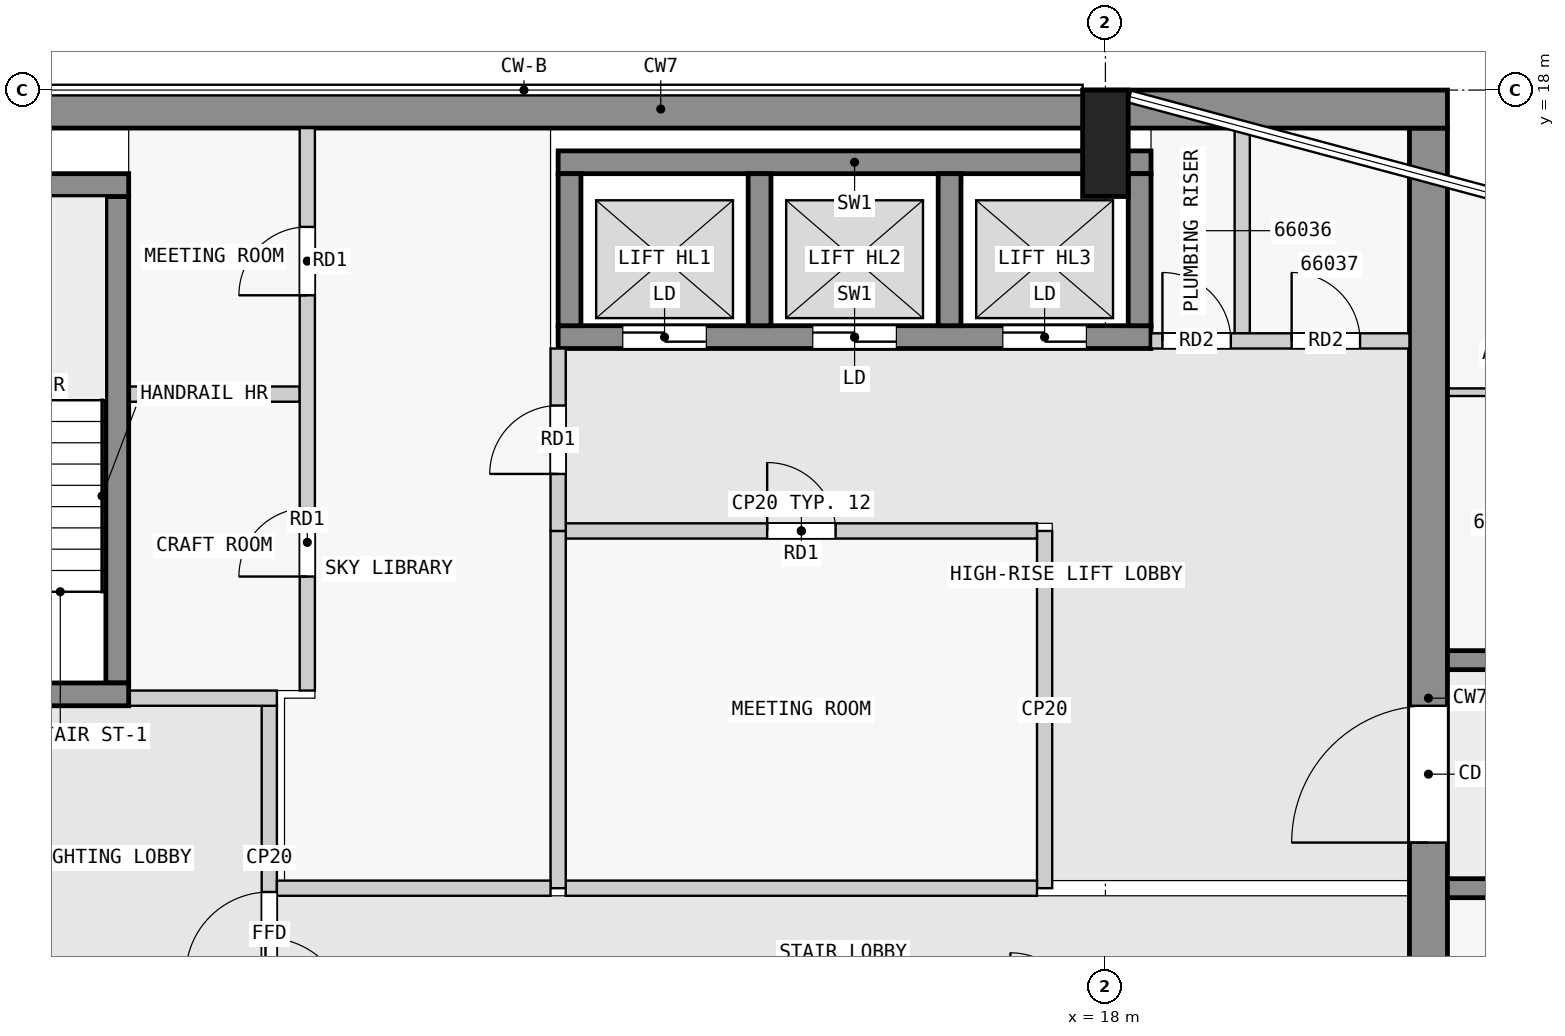
"""IFC4 building model, lengths in metres.
Left out: names, types, materials, properties, quantities, classifications, styles, units other than length and angle.
Written with IfcOpenShell. Run it as: python <this file> out.ifc"""

import sys

from ifc_helpers import new_model, si_unit, direction, frame, frame_2d, origin, origin_2d, place, context, subcontext, project, spatial, rectangle, extrude, element, fill, save


model = new_model("IFC4")
c1 = context("Model", 3, precision=1e-05, world=origin(), true_north=direction((0.0, 1.0)))
c2 = subcontext(c1, "Body", "Model", "MODEL_VIEW")
j1 = project(units=[si_unit("LENGTHUNIT", "METRE"), si_unit("PLANEANGLEUNIT", "RADIAN")], contexts=[c1])
p1 = place(None, origin())
s1 = spatial("IfcSite", under=j1, at=p1, CompositionType="ELEMENT")
p2 = place(p1, origin())
s2 = spatial("IfcBuilding", under=s1, at=p2, CompositionType="ELEMENT")
p3 = place(p2, frame((0.0, 0.0, 252.9)))
s3 = spatial("IfcBuildingStorey", under=s2, at=p3, CompositionType="ELEMENT", Elevation=252.9)
p4 = place(p3, frame((18.0, 17.3, 0.0), z_axis=(0.0, 0.0, 1.0), x_axis=(1.0, 0.0, 0.0)))
e1 = element("IfcColumn", 1, at=p4, inside=s3, PredefinedType="COLUMN", context=c2, shape_type="SweptSolid", body=[
    extrude(rectangle(XDim=0.6, YDim=1.4, at=origin_2d()), origin(), (0.0, 0.0, 1.0), 3.5),
])
p5 = place(p3, frame((1.8, 17.75, 0.0), z_axis=(0.0, 0.0, 1.0), x_axis=(1.0, 0.0, 0.0)))
e2 = element("IfcWall", 2, at=p5, inside=s3, PredefinedType="SHEAR", context=c2, shape_type="SweptSolid", body=[
    extrude(rectangle(XDim=20.7, YDim=0.5, at=frame_2d((10.35, 0.0))), origin(), (0.0, 0.0, 1.0), 3.25),
])
p6 = place(p3, frame((22.25, 2.5, 0.0), z_axis=(0.0, 0.0, 1.0), x_axis=(0.0, 1.0, 0.0)))
e3 = element("IfcWall", 3, at=p6, inside=s3, PredefinedType="SHEAR", context=c2, shape_type="SweptSolid", body=[
    extrude(rectangle(XDim=15.0, YDim=0.5, at=frame_2d((7.5, 0.0))), origin(), (0.0, 0.0, 1.0), 3.25),
])
p7 = place(p6, frame((5.6, 0.0, 0.0)))
e4 = element("IfcOpeningElement", 4, at=p7, cuts=e3, PredefinedType="OPENING", context=c2, shape_type="SweptSolid", body=[
    extrude(rectangle(XDim=1.8, YDim=2.1, at=frame_2d((0.9, 1.05))), frame((0.0, 0.26, 0.0), z_axis=(0.0, -1.0, 0.0), x_axis=(1.0, 0.0, 0.0)), (0.0, 0.0, 1.0), 0.52),
])
p8 = place(p3, frame((2.3, 10.05, 0.0), z_axis=(0.0, 0.0, 1.0), x_axis=(1.0, 0.0, 0.0)))
e5 = element("IfcWall", 5, at=p8, inside=s3, PredefinedType="SHEAR", context=c2, shape_type="SweptSolid", body=[
    extrude(rectangle(XDim=2.85, YDim=0.3, at=frame_2d((1.425, 0.0))), origin(), (0.0, 0.0, 1.0), 3.25),
])
p9 = place(p8, frame((0.25, 0.0, 0.0)))
e6 = element("IfcOpeningElement", 6, at=p9, cuts=e5, PredefinedType="OPENING", context=c2, shape_type="SweptSolid", body=[
    extrude(rectangle(XDim=1.1, YDim=2.1, at=frame_2d((0.55, 1.05))), frame((0.0, 0.16, 0.0), z_axis=(0.0, -1.0, 0.0), x_axis=(1.0, 0.0, 0.0)), (0.0, 0.0, 1.0), 0.32),
])
p10 = place(p3, frame((5.0, 10.2, 0.0), z_axis=(0.0, 0.0, 1.0), x_axis=(0.0, 1.0, 0.0)))
e7 = element("IfcWall", 7, at=p10, inside=s3, PredefinedType="SHEAR", context=c2, shape_type="SweptSolid", body=[
    extrude(rectangle(XDim=6.4, YDim=0.3, at=frame_2d((3.2, 0.0))), origin(), (0.0, 0.0, 1.0), 3.25),
])
p11 = place(p3, frame((2.3, 16.75, 0.0), z_axis=(0.0, 0.0, 1.0), x_axis=(1.0, 0.0, 0.0)))
e8 = element("IfcWall", 8, at=p11, inside=s3, PredefinedType="SHEAR", context=c2, shape_type="SweptSolid", body=[
    extrude(rectangle(XDim=2.85, YDim=0.3, at=frame_2d((1.425, 0.0))), origin(), (0.0, 0.0, 1.0), 3.25),
])
p12 = place(p3, frame((10.8, 17.05, 0.0), z_axis=(0.0, 0.0, 1.0), x_axis=(1.0, 0.0, 0.0)))
e9 = element("IfcWall", 9, at=p12, inside=s3, PredefinedType="SHEAR", context=c2, shape_type="SweptSolid", body=[
    extrude(rectangle(XDim=7.8, YDim=0.3, at=frame_2d((3.9, 0.0))), origin(), (0.0, 0.0, 1.0), 3.25),
])
p13 = place(p3, frame((10.8, 14.75, 0.0), z_axis=(0.0, 0.0, 1.0), x_axis=(1.0, 0.0, 0.0)))
e10 = element("IfcWall", 10, at=p13, inside=s3, PredefinedType="SHEAR", context=c2, shape_type="SweptSolid", body=[
    extrude(rectangle(XDim=7.8, YDim=0.3, at=frame_2d((3.9, 0.0))), origin(), (0.0, 0.0, 1.0), 3.25),
])
p14 = place(p13, frame((0.85, 0.0, 0.0)))
e11 = element("IfcOpeningElement", 11, at=p14, cuts=e10, PredefinedType="OPENING", context=c2, shape_type="SweptSolid", body=[
    extrude(rectangle(XDim=1.1, YDim=2.1, at=frame_2d((0.55, 1.05))), frame((0.0, 0.16, 0.0), z_axis=(0.0, -1.0, 0.0), x_axis=(1.0, 0.0, 0.0)), (0.0, 0.0, 1.0), 0.32),
])
p15 = place(p13, frame((3.35, 0.0, 0.0)))
e12 = element("IfcOpeningElement", 12, at=p15, cuts=e10, PredefinedType="OPENING", context=c2, shape_type="SweptSolid", body=[
    extrude(rectangle(XDim=1.1, YDim=2.1, at=frame_2d((0.55, 1.05))), frame((0.0, 0.16, 0.0), z_axis=(0.0, -1.0, 0.0), x_axis=(1.0, 0.0, 0.0)), (0.0, 0.0, 1.0), 0.32),
])
p16 = place(p13, frame((5.85, 0.0, 0.0)))
e13 = element("IfcOpeningElement", 13, at=p16, cuts=e10, PredefinedType="OPENING", context=c2, shape_type="SweptSolid", body=[
    extrude(rectangle(XDim=1.1, YDim=2.1, at=frame_2d((0.55, 1.05))), frame((0.0, 0.16, 0.0), z_axis=(0.0, -1.0, 0.0), x_axis=(1.0, 0.0, 0.0)), (0.0, 0.0, 1.0), 0.32),
])
for number, where, z_axis, x_axis in (
    (14, (10.95, 14.9, 0.0), (0.0, 0.0, 1.0), (0.0, 1.0, 0.0)),
    (15, (13.45, 14.9, 0.0), (0.0, 0.0, 1.0), (0.0, 1.0, 0.0)),
    (16, (15.95, 14.9, 0.0), (0.0, 0.0, 1.0), (0.0, 1.0, 0.0)),
    (17, (18.45, 14.9, 0.0), (0.0, 0.0, 1.0), (0.0, 1.0, 0.0)),
):
    element("IfcWall", number, at=place(p3, frame(where, z_axis=z_axis, x_axis=x_axis)), inside=s3, PredefinedType="SHEAR", context=c2, shape_type="SweptSolid", body=[
        extrude(rectangle(XDim=2.0, YDim=0.3, at=frame_2d((1.0, 0.0))), origin(), (0.0, 0.0, 1.0), 3.25),
    ])
p17 = place(p3, frame((22.5, 7.5, 0.0), z_axis=(0.0, 0.0, 1.0), x_axis=(1.0, 0.0, 0.0)))
e18 = element("IfcWall", 18, at=p17, inside=s3, PredefinedType="SHEAR", context=c2, shape_type="SweptSolid", body=[
    extrude(rectangle(XDim=22.5, YDim=0.25, at=frame_2d((11.25, 0.0))), origin(), (0.0, 0.0, 1.0), 3.25),
])
p18 = place(p17, frame((1.75, 0.0, 0.0)))
e19 = element("IfcOpeningElement", 19, at=p18, cuts=e18, PredefinedType="OPENING", context=c2, shape_type="SweptSolid", body=[
    extrude(rectangle(XDim=1.0, YDim=2.1, at=frame_2d((0.5, 1.05))), frame((0.0, 0.135, 0.0), z_axis=(0.0, -1.0, 0.0), x_axis=(1.0, 0.0, 0.0)), (0.0, 0.0, 1.0), 0.27),
])
p19 = place(p17, frame((5.85, 0.0, 0.0)))
e20 = element("IfcOpeningElement", 20, at=p19, cuts=e18, PredefinedType="OPENING", context=c2, shape_type="SweptSolid", body=[
    extrude(rectangle(XDim=1.8, YDim=2.1, at=frame_2d((0.9, 1.05))), frame((0.0, 0.135, 0.0), z_axis=(0.0, -1.0, 0.0), x_axis=(1.0, 0.0, 0.0)), (0.0, 0.0, 1.0), 0.27),
])
p20 = place(p17, frame((10.75, 0.0, 0.0)))
e21 = element("IfcOpeningElement", 21, at=p20, cuts=e18, PredefinedType="OPENING", context=c2, shape_type="SweptSolid", body=[
    extrude(rectangle(XDim=1.0, YDim=2.1, at=frame_2d((0.5, 1.05))), frame((0.0, 0.135, 0.0), z_axis=(0.0, -1.0, 0.0), x_axis=(1.0, 0.0, 0.0)), (0.0, 0.0, 1.0), 0.27),
])
p21 = place(p17, frame((15.25, 0.0, 0.0)))
e22 = element("IfcOpeningElement", 22, at=p21, cuts=e18, PredefinedType="OPENING", context=c2, shape_type="SweptSolid", body=[
    extrude(rectangle(XDim=1.0, YDim=2.1, at=frame_2d((0.5, 1.05))), frame((0.0, 0.135, 0.0), z_axis=(0.0, -1.0, 0.0), x_axis=(1.0, 0.0, 0.0)), (0.0, 0.0, 1.0), 0.27),
])
p22 = place(p17, frame((18.75, 0.0, 0.0)))
e23 = element("IfcOpeningElement", 23, at=p22, cuts=e18, PredefinedType="OPENING", context=c2, shape_type="SweptSolid", body=[
    extrude(rectangle(XDim=0.9, YDim=2.1, at=frame_2d((0.45, 1.05))), frame((0.0, 0.135, 0.0), z_axis=(0.0, -1.0, 0.0), x_axis=(1.0, 0.0, 0.0)), (0.0, 0.0, 1.0), 0.27),
])
p23 = place(p17, frame((20.95, 0.0, 0.0)))
e24 = element("IfcOpeningElement", 24, at=p23, cuts=e18, PredefinedType="OPENING", context=c2, shape_type="SweptSolid", body=[
    extrude(rectangle(XDim=1.0, YDim=2.1, at=frame_2d((0.5, 1.05))), frame((0.0, 0.135, 0.0), z_axis=(0.0, -1.0, 0.0), x_axis=(1.0, 0.0, 0.0)), (0.0, 0.0, 1.0), 0.27),
])
p24 = place(p3, frame((22.5, 10.5, 0.0), z_axis=(0.0, 0.0, 1.0), x_axis=(1.0, 0.0, 0.0)))
e25 = element("IfcWall", 25, at=p24, inside=s3, PredefinedType="SHEAR", context=c2, shape_type="SweptSolid", body=[
    extrude(rectangle(XDim=22.5, YDim=0.25, at=frame_2d((11.25, 0.0))), origin(), (0.0, 0.0, 1.0), 3.25),
])
p25 = place(p24, frame((1.75, 0.0, 0.0)))
e26 = element("IfcOpeningElement", 26, at=p25, cuts=e25, PredefinedType="OPENING", context=c2, shape_type="SweptSolid", body=[
    extrude(rectangle(XDim=1.0, YDim=2.1, at=frame_2d((0.5, 1.05))), frame((0.0, 0.135, 0.0), z_axis=(0.0, -1.0, 0.0), x_axis=(1.0, 0.0, 0.0)), (0.0, 0.0, 1.0), 0.27),
])
p26 = place(p24, frame((6.25, 0.0, 0.0)))
e27 = element("IfcOpeningElement", 27, at=p26, cuts=e25, PredefinedType="OPENING", context=c2, shape_type="SweptSolid", body=[
    extrude(rectangle(XDim=1.0, YDim=2.1, at=frame_2d((0.5, 1.05))), frame((0.0, 0.135, 0.0), z_axis=(0.0, -1.0, 0.0), x_axis=(1.0, 0.0, 0.0)), (0.0, 0.0, 1.0), 0.27),
])
p27 = place(p24, frame((10.75, 0.0, 0.0)))
e28 = element("IfcOpeningElement", 28, at=p27, cuts=e25, PredefinedType="OPENING", context=c2, shape_type="SweptSolid", body=[
    extrude(rectangle(XDim=1.0, YDim=2.1, at=frame_2d((0.5, 1.05))), frame((0.0, 0.135, 0.0), z_axis=(0.0, -1.0, 0.0), x_axis=(1.0, 0.0, 0.0)), (0.0, 0.0, 1.0), 0.27),
])
p28 = place(p24, frame((16.85, 0.0, 0.0)))
e29 = element("IfcOpeningElement", 29, at=p28, cuts=e25, PredefinedType="OPENING", context=c2, shape_type="SweptSolid", body=[
    extrude(rectangle(XDim=1.0, YDim=2.1, at=frame_2d((0.5, 1.05))), frame((0.0, 0.135, 0.0), z_axis=(0.0, -1.0, 0.0), x_axis=(1.0, 0.0, 0.0)), (0.0, 0.0, 1.0), 0.27),
])
p29 = place(p3, frame((7.0, 5.9, 0.0), z_axis=(0.0, 0.0, 1.0), x_axis=(0.0, 1.0, 0.0)))
e30 = element("IfcWall", 30, at=p29, inside=s3, PredefinedType="PARTITIONING", context=c2, shape_type="SweptSolid", body=[
    extrude(rectangle(XDim=4.0, YDim=0.2, at=frame_2d((2.0, 0.0))), origin(), (0.0, 0.0, 1.0), 3.25),
])
p30 = place(p29, frame((0.45, 0.0, 0.0)))
e31 = element("IfcOpeningElement", 31, at=p30, cuts=e30, PredefinedType="OPENING", context=c2, shape_type="SweptSolid", body=[
    extrude(rectangle(XDim=1.1, YDim=2.1, at=frame_2d((0.55, 1.05))), frame((0.0, 0.11, 0.0), z_axis=(0.0, -1.0, 0.0), x_axis=(1.0, 0.0, 0.0)), (0.0, 0.0, 1.0), 0.22),
])
p31 = place(p3, frame((5.15, 10.0, 0.0), z_axis=(0.0, 0.0, 1.0), x_axis=(1.0, 0.0, 0.0)))
e32 = element("IfcWall", 32, at=p31, inside=s3, PredefinedType="PARTITIONING", context=c2, shape_type="SweptSolid", body=[
    extrude(rectangle(XDim=1.95, YDim=0.2, at=frame_2d((0.975, 0.0))), origin(), (0.0, 0.0, 1.0), 3.25),
])
p32 = place(p3, frame((7.1, 7.5, 0.0), z_axis=(0.0, 0.0, 1.0), x_axis=(1.0, 0.0, 0.0)))
e33 = element("IfcWall", 33, at=p32, inside=s3, PredefinedType="PARTITIONING", context=c2, shape_type="SweptSolid", body=[
    extrude(rectangle(XDim=3.6, YDim=0.2, at=frame_2d((1.8, 0.0))), origin(), (0.0, 0.0, 1.0), 3.25),
])
p33 = place(p3, frame((10.8, 12.2, 0.0), z_axis=(0.0, 0.0, 1.0), x_axis=(0.0, 1.0, 0.0)))
e34 = element("IfcWall", 34, at=p33, inside=s3, PredefinedType="PARTITIONING", context=c2, shape_type="SweptSolid", body=[
    extrude(rectangle(XDim=2.4, YDim=0.2, at=frame_2d((1.2, 0.0))), origin(), (0.0, 0.0, 1.0), 3.25),
])
p34 = place(p33, frame((0.75, 0.0, 0.0)))
e35 = element("IfcOpeningElement", 35, at=p34, cuts=e34, PredefinedType="OPENING", context=c2, shape_type="SweptSolid", body=[
    extrude(rectangle(XDim=0.9, YDim=2.1, at=frame_2d((0.45, 1.05))), frame((0.0, 0.11, 0.0), z_axis=(0.0, -1.0, 0.0), x_axis=(1.0, 0.0, 0.0)), (0.0, 0.0, 1.0), 0.22),
])
p35 = place(p3, frame((10.8, 7.5, 0.0), z_axis=(0.0, 0.0, 1.0), x_axis=(0.0, 1.0, 0.0)))
e36 = element("IfcWall", 36, at=p35, inside=s3, PredefinedType="PARTITIONING", context=c2, shape_type="SweptSolid", body=[
    extrude(rectangle(XDim=4.7, YDim=0.2, at=frame_2d((2.35, 0.0))), origin(), (0.0, 0.0, 1.0), 3.25),
])
p36 = place(p3, frame((10.9, 7.5, 0.0), z_axis=(0.0, 0.0, 1.0), x_axis=(1.0, 0.0, 0.0)))
e37 = element("IfcWall", 37, at=p36, inside=s3, PredefinedType="PARTITIONING", context=c2, shape_type="SweptSolid", body=[
    extrude(rectangle(XDim=6.2, YDim=0.2, at=frame_2d((3.1, 0.0))), origin(), (0.0, 0.0, 1.0), 3.25),
])
p37 = place(p3, frame((17.2, 7.5, 0.0), z_axis=(0.0, 0.0, 1.0), x_axis=(0.0, 1.0, 0.0)))
e38 = element("IfcWall", 38, at=p37, inside=s3, PredefinedType="PARTITIONING", context=c2, shape_type="SweptSolid", body=[
    extrude(rectangle(XDim=4.7, YDim=0.2, at=frame_2d((2.35, 0.0))), origin(), (0.0, 0.0, 1.0), 3.25),
])
p38 = place(p3, frame((10.9, 12.2, 0.0), z_axis=(0.0, 0.0, 1.0), x_axis=(1.0, 0.0, 0.0)))
e39 = element("IfcWall", 39, at=p38, inside=s3, PredefinedType="PARTITIONING", context=c2, shape_type="SweptSolid", body=[
    extrude(rectangle(XDim=6.2, YDim=0.2, at=frame_2d((3.1, 0.0))), origin(), (0.0, 0.0, 1.0), 3.25),
])
p39 = place(p38, frame((2.65, 0.0, 0.0)))
e40 = element("IfcOpeningElement", 40, at=p39, cuts=e39, PredefinedType="OPENING", context=c2, shape_type="SweptSolid", body=[
    extrude(rectangle(XDim=0.9, YDim=2.1, at=frame_2d((0.45, 1.05))), frame((0.0, 0.11, 0.0), z_axis=(0.0, -1.0, 0.0), x_axis=(1.0, 0.0, 0.0)), (0.0, 0.0, 1.0), 0.22),
])
p40 = place(p3, frame((7.5, 10.1, 0.0), z_axis=(0.0, 0.0, 1.0), x_axis=(0.0, 1.0, 0.0)))
e41 = element("IfcWall", 41, at=p40, inside=s3, PredefinedType="PARTITIONING", context=c2, shape_type="SweptSolid", body=[
    extrude(rectangle(XDim=7.4, YDim=0.2, at=frame_2d((3.7, 0.0))), origin(), (0.0, 0.0, 1.0), 3.25),
])
p41 = place(p40, frame((1.5, 0.0, 0.0)))
e42 = element("IfcOpeningElement", 42, at=p41, cuts=e41, PredefinedType="OPENING", context=c2, shape_type="SweptSolid", body=[
    extrude(rectangle(XDim=0.9, YDim=2.1, at=frame_2d((0.45, 1.05))), frame((0.0, 0.11, 0.0), z_axis=(0.0, -1.0, 0.0), x_axis=(1.0, 0.0, 0.0)), (0.0, 0.0, 1.0), 0.22),
])
p42 = place(p40, frame((5.2, 0.0, 0.0)))
e43 = element("IfcOpeningElement", 43, at=p42, cuts=e41, PredefinedType="OPENING", context=c2, shape_type="SweptSolid", body=[
    extrude(rectangle(XDim=0.9, YDim=2.1, at=frame_2d((0.45, 1.05))), frame((0.0, 0.11, 0.0), z_axis=(0.0, -1.0, 0.0), x_axis=(1.0, 0.0, 0.0)), (0.0, 0.0, 1.0), 0.22),
])
p43 = place(p3, frame((5.15, 14.0, 0.0), z_axis=(0.0, 0.0, 1.0), x_axis=(1.0, 0.0, 0.0)))
e44 = element("IfcWall", 44, at=p43, inside=s3, PredefinedType="PARTITIONING", context=c2, shape_type="SweptSolid", body=[
    extrude(rectangle(XDim=2.25, YDim=0.2, at=frame_2d((1.125, 0.0))), origin(), (0.0, 0.0, 1.0), 3.25),
])
p44 = place(p3, frame((18.6, 14.7, 0.0), z_axis=(0.0, 0.0, 1.0), x_axis=(1.0, 0.0, 0.0)))
e45 = element("IfcWall", 45, at=p44, inside=s3, PredefinedType="PARTITIONING", context=c2, shape_type="SweptSolid", body=[
    extrude(rectangle(XDim=3.4, YDim=0.2, at=frame_2d((1.7, 0.0))), origin(), (0.0, 0.0, 1.0), 3.25),
])
p45 = place(p44, frame((0.15, 0.0, 0.0)))
e46 = element("IfcOpeningElement", 46, at=p45, cuts=e45, PredefinedType="OPENING", context=c2, shape_type="SweptSolid", body=[
    extrude(rectangle(XDim=0.9, YDim=2.1, at=frame_2d((0.45, 1.05))), frame((0.0, 0.11, 0.0), z_axis=(0.0, -1.0, 0.0), x_axis=(1.0, 0.0, 0.0)), (0.0, 0.0, 1.0), 0.22),
])
p46 = place(p44, frame((1.85, 0.0, 0.0)))
e47 = element("IfcOpeningElement", 47, at=p46, cuts=e45, PredefinedType="OPENING", context=c2, shape_type="SweptSolid", body=[
    extrude(rectangle(XDim=0.9, YDim=2.1, at=frame_2d((0.45, 1.05))), frame((0.0, 0.11, 0.0), z_axis=(0.0, -1.0, 0.0), x_axis=(1.0, 0.0, 0.0)), (0.0, 0.0, 1.0), 0.22),
])
p47 = place(p3, frame((19.8, 14.8, 0.0), z_axis=(0.0, 0.0, 1.0), x_axis=(0.0, 1.0, 0.0)))
e48 = element("IfcWall", 48, at=p47, inside=s3, PredefinedType="PARTITIONING", context=c2, shape_type="SweptSolid", body=[
    extrude(rectangle(XDim=2.7, YDim=0.2, at=frame_2d((1.35, 0.0))), origin(), (0.0, 0.0, 1.0), 3.25),
])
p48 = place(p3, frame((23.95, 14.025, 0.0), z_axis=(0.0, 0.0, 1.0), x_axis=(-1.0, 0.0, 0.0)))
e49 = element("IfcWall", 49, at=p48, inside=s3, PredefinedType="PARTITIONING", context=c2, shape_type="SweptSolid", body=[
    extrude(rectangle(XDim=1.45, YDim=0.1, at=frame_2d((0.725, 0.0))), origin(), (0.0, 0.0, 1.0), 3.25),
])
p49 = place(p30, origin())
e50 = element("IfcDoor", 50, at=p49, inside=s3, OperationType="SINGLE_SWING_LEFT", PredefinedType="DOOR", context=c2, shape_type="SweptSolid", body=[
    extrude(rectangle(XDim=1.1, YDim=2.1, at=frame_2d((0.55, 1.05))), frame((0.0, 0.025, 0.0), z_axis=(0.0, -1.0, 0.0), x_axis=(1.0, 0.0, 0.0)), (0.0, 0.0, 1.0), 0.05),
])
fill(e31, e50)
p50 = place(p34, origin())
e51 = element("IfcDoor", 51, at=p50, inside=s3, OperationType="SINGLE_SWING_LEFT", PredefinedType="DOOR", context=c2, shape_type="SweptSolid", body=[
    extrude(rectangle(XDim=0.9, YDim=2.1, at=frame_2d((0.45, 1.05))), frame((0.0, 0.025, 0.0), z_axis=(0.0, -1.0, 0.0), x_axis=(1.0, 0.0, 0.0)), (0.0, 0.0, 1.0), 0.05),
])
fill(e35, e51)
p51 = place(p39, origin())
e52 = element("IfcDoor", 52, at=p51, inside=s3, OperationType="SINGLE_SWING_LEFT", PredefinedType="DOOR", context=c2, shape_type="SweptSolid", body=[
    extrude(rectangle(XDim=0.9, YDim=2.1, at=frame_2d((0.45, 1.05))), frame((0.0, 0.025, 0.0), z_axis=(0.0, -1.0, 0.0), x_axis=(1.0, 0.0, 0.0)), (0.0, 0.0, 1.0), 0.05),
])
fill(e40, e52)
p52 = place(p14, origin())
e53 = element("IfcDoor", 53, at=p52, inside=s3, OperationType="DOUBLE_DOOR_SLIDING", PredefinedType="DOOR", context=c2, shape_type="SweptSolid", body=[
    extrude(rectangle(XDim=1.1, YDim=2.1, at=frame_2d((0.55, 1.05))), frame((0.0, 0.025, 0.0), z_axis=(0.0, -1.0, 0.0), x_axis=(1.0, 0.0, 0.0)), (0.0, 0.0, 1.0), 0.05),
])
fill(e11, e53)
p53 = place(p15, origin())
e54 = element("IfcDoor", 54, at=p53, inside=s3, OperationType="DOUBLE_DOOR_SLIDING", PredefinedType="DOOR", context=c2, shape_type="SweptSolid", body=[
    extrude(rectangle(XDim=1.1, YDim=2.1, at=frame_2d((0.55, 1.05))), frame((0.0, 0.025, 0.0), z_axis=(0.0, -1.0, 0.0), x_axis=(1.0, 0.0, 0.0)), (0.0, 0.0, 1.0), 0.05),
])
fill(e12, e54)
p54 = place(p16, origin())
e55 = element("IfcDoor", 55, at=p54, inside=s3, OperationType="DOUBLE_DOOR_SLIDING", PredefinedType="DOOR", context=c2, shape_type="SweptSolid", body=[
    extrude(rectangle(XDim=1.1, YDim=2.1, at=frame_2d((0.55, 1.05))), frame((0.0, 0.025, 0.0), z_axis=(0.0, -1.0, 0.0), x_axis=(1.0, 0.0, 0.0)), (0.0, 0.0, 1.0), 0.05),
])
fill(e13, e55)
p55 = place(p7, origin())
e56 = element("IfcDoor", 56, at=p55, inside=s3, OperationType="DOUBLE_DOOR_SINGLE_SWING", PredefinedType="DOOR", context=c2, shape_type="SweptSolid", body=[
    extrude(rectangle(XDim=1.8, YDim=2.1, at=frame_2d((0.9, 1.05))), frame((0.0, 0.025, 0.0), z_axis=(0.0, -1.0, 0.0), x_axis=(1.0, 0.0, 0.0)), (0.0, 0.0, 1.0), 0.05),
])
fill(e4, e56)
p56 = place(p41, origin())
e57 = element("IfcDoor", 57, at=p56, inside=s3, OperationType="SINGLE_SWING_RIGHT", PredefinedType="DOOR", context=c2, shape_type="SweptSolid", body=[
    extrude(rectangle(XDim=0.9, YDim=2.1, at=frame_2d((0.45, 1.05))), frame((0.0, 0.025, 0.0), z_axis=(0.0, -1.0, 0.0), x_axis=(1.0, 0.0, 0.0)), (0.0, 0.0, 1.0), 0.05),
])
fill(e42, e57)
p57 = place(p42, origin())
e58 = element("IfcDoor", 58, at=p57, inside=s3, OperationType="SINGLE_SWING_RIGHT", PredefinedType="DOOR", context=c2, shape_type="SweptSolid", body=[
    extrude(rectangle(XDim=0.9, YDim=2.1, at=frame_2d((0.45, 1.05))), frame((0.0, 0.025, 0.0), z_axis=(0.0, -1.0, 0.0), x_axis=(1.0, 0.0, 0.0)), (0.0, 0.0, 1.0), 0.05),
])
fill(e43, e58)
p58 = place(p45, origin())
e59 = element("IfcDoor", 59, at=p58, inside=s3, OperationType="SINGLE_SWING_LEFT", PredefinedType="DOOR", context=c2, shape_type="SweptSolid", body=[
    extrude(rectangle(XDim=0.9, YDim=2.1, at=frame_2d((0.45, 1.05))), frame((0.0, 0.025, 0.0), z_axis=(0.0, -1.0, 0.0), x_axis=(1.0, 0.0, 0.0)), (0.0, 0.0, 1.0), 0.05),
])
fill(e46, e59)
p59 = place(p46, origin())
e60 = element("IfcDoor", 60, at=p59, inside=s3, OperationType="SINGLE_SWING_LEFT", PredefinedType="DOOR", context=c2, shape_type="SweptSolid", body=[
    extrude(rectangle(XDim=0.9, YDim=2.1, at=frame_2d((0.45, 1.05))), frame((0.0, 0.025, 0.0), z_axis=(0.0, -1.0, 0.0), x_axis=(1.0, 0.0, 0.0)), (0.0, 0.0, 1.0), 0.05),
])
fill(e47, e60)
save(model, sys.argv[1])
